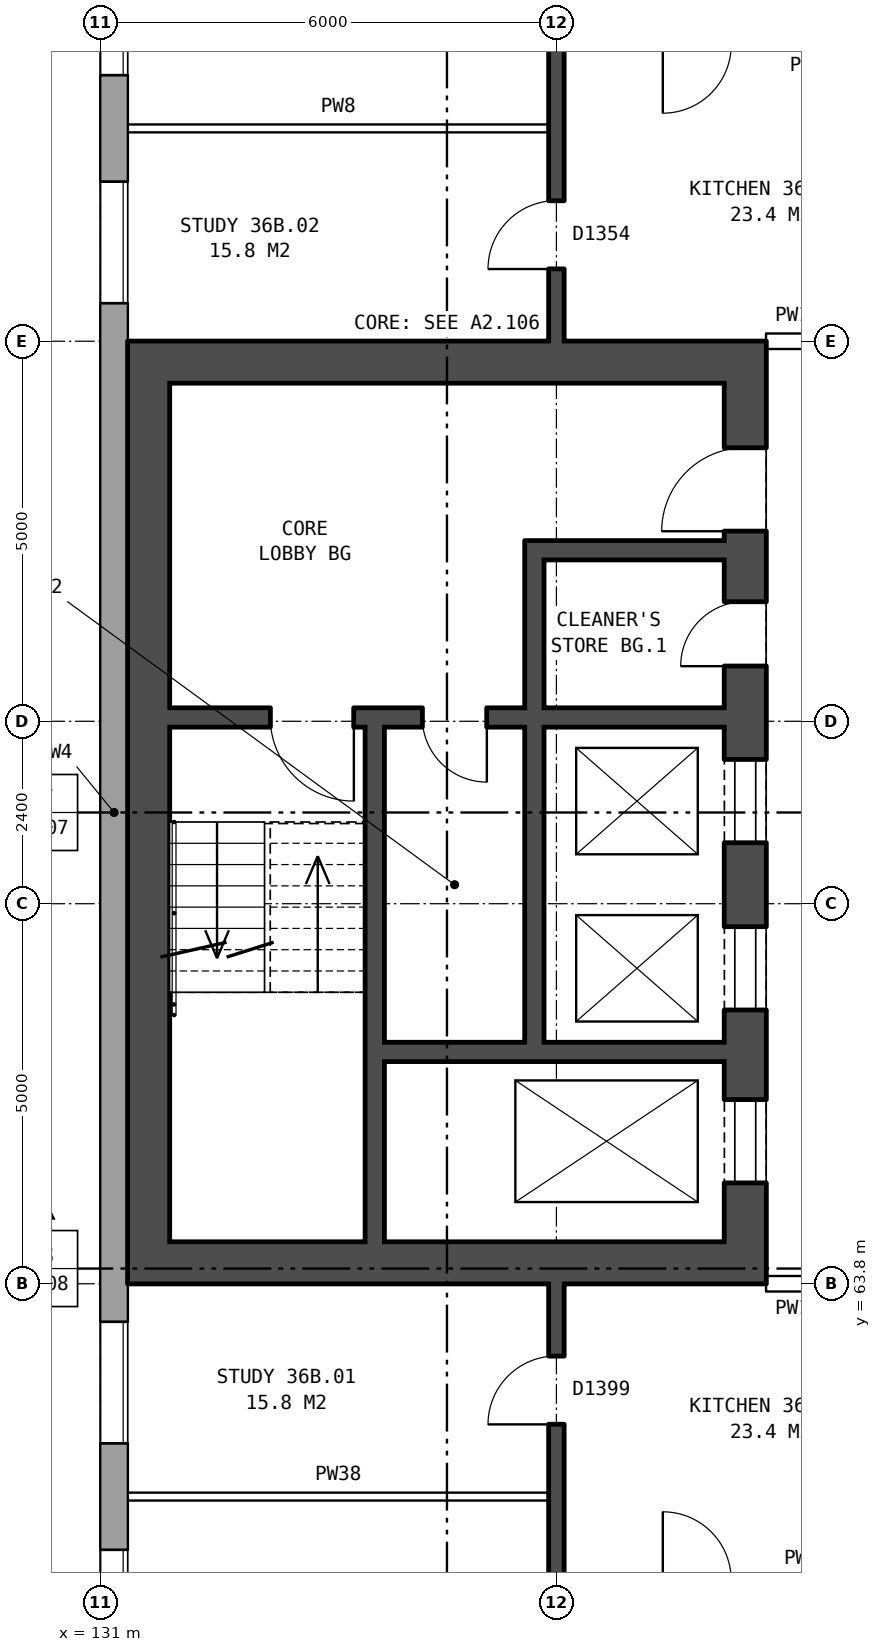
"""IFC4 building model, lengths in metres.
Left out: names, types, materials, properties, quantities, classifications, styles, units other than length and angle.
Written with IfcOpenShell. Run it as: python <this file> out.ifc"""

import sys

from ifc_helpers import new_model, si_unit, direction, frame, frame_2d, origin, place, context, subcontext, project, spatial, rectangle, extrude, element, fill, save


model = new_model("IFC4")
c1 = context("Model", 3, precision=1e-05, world=origin(), true_north=direction((0.0, 1.0)))
c2 = subcontext(c1, "Body", "Model", "MODEL_VIEW")
j1 = project(units=[si_unit("LENGTHUNIT", "METRE"), si_unit("PLANEANGLEUNIT", "RADIAN")], contexts=[c1])
p1 = place(None, origin())
s1 = spatial("IfcSite", under=j1, at=p1, CompositionType="ELEMENT")
p2 = place(p1, origin())
s2 = spatial("IfcBuilding", under=s1, at=p2, CompositionType="ELEMENT")
p3 = place(p2, frame((0.0, 0.0, 129.9)))
s3 = spatial("IfcBuildingStorey", under=s2, at=p3, CompositionType="ELEMENT", Elevation=129.9)
p4 = place(p3, frame((131.18, 82.925, 0.0), z_axis=(0.0, 0.0, 1.0), x_axis=(0.0, -1.0, 0.0)))
e1 = element("IfcWall", 1, at=p4, inside=s3, PredefinedType="STANDARD", context=c2, shape_type="SweptSolid", body=[
    extrude(rectangle(XDim=25.851, YDim=0.36, at=frame_2d((12.925, 0.0))), origin(), (0.0, 0.0, 1.0), 2.85),
])
p5 = place(p4, frame((1.625, 0.0, 0.8)))
e2 = element("IfcOpeningElement", 2, at=p5, cuts=e1, PredefinedType="OPENING", context=c2, shape_type="SweptSolid", body=[
    extrude(rectangle(XDim=1.6, YDim=1.8, at=frame_2d((0.8, 0.9))), frame((0.0, 0.19, 0.0), z_axis=(0.0, -1.0, 0.0), x_axis=(1.0, 0.0, 0.0)), (0.0, 0.0, 1.0), 0.38),
])
p6 = place(p4, frame((4.625, 0.0, 0.8)))
e3 = element("IfcOpeningElement", 3, at=p6, cuts=e1, PredefinedType="OPENING", context=c2, shape_type="SweptSolid", body=[
    extrude(rectangle(XDim=1.6, YDim=1.8, at=frame_2d((0.8, 0.9))), frame((0.0, 0.19, 0.0), z_axis=(0.0, -1.0, 0.0), x_axis=(1.0, 0.0, 0.0)), (0.0, 0.0, 1.0), 0.38),
])
p7 = place(p4, frame((19.625, 0.0, 0.8)))
e4 = element("IfcOpeningElement", 4, at=p7, cuts=e1, PredefinedType="OPENING", context=c2, shape_type="SweptSolid", body=[
    extrude(rectangle(XDim=1.6, YDim=1.8, at=frame_2d((0.8, 0.9))), frame((0.0, 0.19, 0.0), z_axis=(0.0, -1.0, 0.0), x_axis=(1.0, 0.0, 0.0)), (0.0, 0.0, 1.0), 0.38),
])
p8 = place(p4, frame((22.625, 0.0, 0.8)))
e5 = element("IfcOpeningElement", 5, at=p8, cuts=e1, PredefinedType="OPENING", context=c2, shape_type="SweptSolid", body=[
    extrude(rectangle(XDim=1.6, YDim=1.8, at=frame_2d((0.8, 0.9))), frame((0.0, 0.19, 0.0), z_axis=(0.0, -1.0, 0.0), x_axis=(1.0, 0.0, 0.0)), (0.0, 0.0, 1.0), 0.38),
])
p9 = place(p3, frame((139.485, 63.8, 0.0), z_axis=(0.0, 0.0, 1.0), x_axis=(0.0, 1.0, 0.0)))
e6 = element("IfcWall", 6, at=p9, inside=s3, PredefinedType="SHEAR", context=c2, shape_type="SweptSolid", body=[
    extrude(rectangle(XDim=12.4, YDim=0.55, at=frame_2d((6.2, 0.0))), origin(), (0.0, 0.0, 1.0), 2.85),
])
p10 = place(p9, frame((1.325, 0.0, 0.0)))
e7 = element("IfcOpeningElement", 7, at=p10, cuts=e6, PredefinedType="OPENING", context=c2, shape_type="SweptSolid", body=[
    extrude(rectangle(XDim=1.1, YDim=2.1, at=frame_2d((0.55, 1.05))), frame((0.0, 0.285, 0.0), z_axis=(0.0, -1.0, 0.0), x_axis=(1.0, 0.0, 0.0)), (0.0, 0.0, 1.0), 0.57),
])
p11 = place(p9, frame((3.6, 0.0, 0.0)))
e8 = element("IfcOpeningElement", 8, at=p11, cuts=e6, PredefinedType="OPENING", context=c2, shape_type="SweptSolid", body=[
    extrude(rectangle(XDim=1.1, YDim=2.1, at=frame_2d((0.55, 1.05))), frame((0.0, 0.285, 0.0), z_axis=(0.0, -1.0, 0.0), x_axis=(1.0, 0.0, 0.0)), (0.0, 0.0, 1.0), 0.57),
])
p12 = place(p9, frame((5.8, 0.0, 0.0)))
e9 = element("IfcOpeningElement", 9, at=p12, cuts=e6, PredefinedType="OPENING", context=c2, shape_type="SweptSolid", body=[
    extrude(rectangle(XDim=1.1, YDim=2.1, at=frame_2d((0.55, 1.05))), frame((0.0, 0.285, 0.0), z_axis=(0.0, -1.0, 0.0), x_axis=(1.0, 0.0, 0.0)), (0.0, 0.0, 1.0), 0.57),
])
p13 = place(p9, frame((9.9, 0.0, 0.0)))
e10 = element("IfcOpeningElement", 10, at=p13, cuts=e6, PredefinedType="OPENING", context=c2, shape_type="SweptSolid", body=[
    extrude(rectangle(XDim=1.1, YDim=2.1, at=frame_2d((0.55, 1.05))), frame((0.0, 0.285, 0.0), z_axis=(0.0, -1.0, 0.0), x_axis=(1.0, 0.0, 0.0)), (0.0, 0.0, 1.0), 0.57),
])
p14 = place(p9, frame((8.125, 0.0, 0.0)))
e11 = element("IfcOpeningElement", 11, at=p14, cuts=e6, PredefinedType="OPENING", context=c2, shape_type="SweptSolid", body=[
    extrude(rectangle(XDim=0.85, YDim=2.1, at=frame_2d((0.425, 1.05))), frame((0.0, 0.285, 0.0), z_axis=(0.0, -1.0, 0.0), x_axis=(1.0, 0.0, 0.0)), (0.0, 0.0, 1.0), 0.57),
])
p15 = place(p3, frame((131.635, 63.8, 0.0), z_axis=(0.0, 0.0, 1.0), x_axis=(0.0, 1.0, 0.0)))
e12 = element("IfcWall", 12, at=p15, inside=s3, PredefinedType="SHEAR", context=c2, shape_type="SweptSolid", body=[
    extrude(rectangle(XDim=12.4, YDim=0.55, at=frame_2d((6.2, 0.0))), origin(), (0.0, 0.0, 1.0), 2.85),
])
for number, where, z_axis, x_axis in (
    (13, (139.21, 64.075, 0.0), (0.0, 0.0, 1.0), (-1.0, 0.0, 0.0)),
    (14, (139.21, 75.925, 0.0), (0.0, 0.0, 1.0), (-1.0, 0.0, 0.0)),
):
    element("IfcWall", number, at=place(p3, frame(where, z_axis=z_axis, x_axis=x_axis)), inside=s3, PredefinedType="SHEAR", context=c2, shape_type="SweptSolid", body=[
        extrude(rectangle(XDim=7.3, YDim=0.55, at=frame_2d((3.65, 0.0))), origin(), (0.0, 0.0, 1.0), 2.85),
    ])
p16 = place(p3, frame((139.21, 66.85, 0.0), z_axis=(0.0, 0.0, 1.0), x_axis=(-1.0, 0.0, 0.0)))
e15 = element("IfcWall", 15, at=p16, inside=s3, PredefinedType="SHEAR", context=c2, shape_type="SweptSolid", body=[
    extrude(rectangle(XDim=4.475, YDim=0.25, at=frame_2d((2.237, 0.0))), origin(), (0.0, 0.0, 1.0), 2.85),
])
p17 = place(p3, frame((139.21, 71.25, 0.0), z_axis=(0.0, 0.0, 1.0), x_axis=(-1.0, 0.0, 0.0)))
e16 = element("IfcWall", 16, at=p17, inside=s3, PredefinedType="SHEAR", context=c2, shape_type="SweptSolid", body=[
    extrude(rectangle(XDim=7.3, YDim=0.25, at=frame_2d((3.65, 0.0))), origin(), (0.0, 0.0, 1.0), 2.85),
])
p18 = place(p17, frame((4.875, 0.0, 0.0)))
e17 = element("IfcOpeningElement", 17, at=p18, cuts=e16, PredefinedType="OPENING", context=c2, shape_type="SweptSolid", body=[
    extrude(rectangle(XDim=1.1, YDim=2.1, at=frame_2d((0.55, 1.05))), frame((0.0, 0.135, 0.0), z_axis=(0.0, -1.0, 0.0), x_axis=(1.0, 0.0, 0.0)), (0.0, 0.0, 1.0), 0.27),
])
p19 = place(p17, frame((3.125, 0.0, 0.0)))
e18 = element("IfcOpeningElement", 18, at=p19, cuts=e16, PredefinedType="OPENING", context=c2, shape_type="SweptSolid", body=[
    extrude(rectangle(XDim=0.85, YDim=2.1, at=frame_2d((0.425, 1.05))), frame((0.0, 0.135, 0.0), z_axis=(0.0, -1.0, 0.0), x_axis=(1.0, 0.0, 0.0)), (0.0, 0.0, 1.0), 0.27),
])
p20 = place(p3, frame((139.21, 73.45, 0.0), z_axis=(0.0, 0.0, 1.0), x_axis=(-1.0, 0.0, 0.0)))
e19 = element("IfcWall", 19, at=p20, inside=s3, PredefinedType="SHEAR", context=c2, shape_type="SweptSolid", body=[
    extrude(rectangle(XDim=2.375, YDim=0.25, at=frame_2d((1.188, 0.0))), origin(), (0.0, 0.0, 1.0), 2.85),
])
p21 = place(p3, frame((136.71, 66.975, 0.0), z_axis=(0.0, 0.0, 1.0), x_axis=(0.0, 1.0, 0.0)))
e20 = element("IfcWall", 20, at=p21, inside=s3, PredefinedType="SHEAR", context=c2, shape_type="SweptSolid", body=[
    extrude(rectangle(XDim=4.15, YDim=0.25, at=frame_2d((2.075, 0.0))), origin(), (0.0, 0.0, 1.0), 2.85),
])
p22 = place(p3, frame((136.71, 71.375, 0.0), z_axis=(0.0, 0.0, 1.0), x_axis=(0.0, 1.0, 0.0)))
e21 = element("IfcWall", 21, at=p22, inside=s3, PredefinedType="SHEAR", context=c2, shape_type="SweptSolid", body=[
    extrude(rectangle(XDim=2.2, YDim=0.25, at=frame_2d((1.1, 0.0))), origin(), (0.0, 0.0, 1.0), 2.85),
])
p23 = place(p3, frame((134.61, 64.35, 0.0), z_axis=(0.0, 0.0, 1.0), x_axis=(0.0, 1.0, 0.0)))
e22 = element("IfcWall", 22, at=p23, inside=s3, PredefinedType="SHEAR", context=c2, shape_type="SweptSolid", body=[
    extrude(rectangle(XDim=6.775, YDim=0.25, at=frame_2d((3.387, 0.0))), origin(), (0.0, 0.0, 1.0), 2.85),
])
p24 = place(p3, frame((131.36, 61.0, 0.0), z_axis=(0.0, 0.0, 1.0), x_axis=(1.0, 0.0, 0.0)))
e23 = element("IfcWall", 23, at=p24, inside=s3, PredefinedType="PARTITIONING", context=c2, shape_type="SweptSolid", body=[
    extrude(rectangle(XDim=5.54, YDim=0.1, at=frame_2d((2.77, 0.0))), origin(), (0.0, 0.0, 1.0), 2.85),
])
p25 = place(p3, frame((139.76, 63.8, 0.0), z_axis=(0.0, 0.0, 1.0), x_axis=(1.0, 0.0, 0.0)))
e24 = element("IfcWall", 24, at=p25, inside=s3, PredefinedType="PARTITIONING", context=c2, shape_type="SweptSolid", body=[
    extrude(rectangle(XDim=3.0, YDim=0.2, at=frame_2d((1.5, 0.0))), origin(), (0.0, 0.0, 1.0), 2.85),
])
p26 = place(p25, frame((1.0, 0.0, 0.0)))
e25 = element("IfcOpeningElement", 25, at=p26, cuts=e24, PredefinedType="OPENING", context=c2, shape_type="SweptSolid", body=[
    extrude(rectangle(XDim=1.0, YDim=2.1, at=frame_2d((0.5, 1.05))), frame((0.0, 0.11, 0.0), z_axis=(0.0, -1.0, 0.0), x_axis=(1.0, 0.0, 0.0)), (0.0, 0.0, 1.0), 0.22),
])
p27 = place(p3, frame((139.76, 76.2, 0.0), z_axis=(0.0, 0.0, 1.0), x_axis=(1.0, 0.0, 0.0)))
e26 = element("IfcWall", 26, at=p27, inside=s3, PredefinedType="PARTITIONING", context=c2, shape_type="SweptSolid", body=[
    extrude(rectangle(XDim=3.0, YDim=0.2, at=frame_2d((1.5, 0.0))), origin(), (0.0, 0.0, 1.0), 2.85),
])
p28 = place(p27, frame((1.0, 0.0, 0.0)))
e27 = element("IfcOpeningElement", 27, at=p28, cuts=e26, PredefinedType="OPENING", context=c2, shape_type="SweptSolid", body=[
    extrude(rectangle(XDim=1.0, YDim=2.1, at=frame_2d((0.5, 1.05))), frame((0.0, 0.11, 0.0), z_axis=(0.0, -1.0, 0.0), x_axis=(1.0, 0.0, 0.0)), (0.0, 0.0, 1.0), 0.22),
])
p29 = place(p3, frame((131.36, 79.0, 0.0), z_axis=(0.0, 0.0, 1.0), x_axis=(1.0, 0.0, 0.0)))
e28 = element("IfcWall", 28, at=p29, inside=s3, PredefinedType="PARTITIONING", context=c2, shape_type="SweptSolid", body=[
    extrude(rectangle(XDim=5.54, YDim=0.1, at=frame_2d((2.77, 0.0))), origin(), (0.0, 0.0, 1.0), 2.85),
])
p30 = place(p3, frame((137.0, 54.36, 0.0), z_axis=(0.0, 0.0, 1.0), x_axis=(0.0, 1.0, 0.0)))
e29 = element("IfcWall", 29, at=p30, inside=s3, PredefinedType="SOLIDWALL", context=c2, shape_type="SweptSolid", body=[
    extrude(rectangle(XDim=9.44, YDim=0.2, at=frame_2d((4.72, 0.0))), origin(), (0.0, 0.0, 1.0), 2.85),
])
p31 = place(p30, frame((2.32, 0.0, 0.0)))
e30 = element("IfcOpeningElement", 30, at=p31, cuts=e29, PredefinedType="OPENING", context=c2, shape_type="SweptSolid", body=[
    extrude(rectangle(XDim=0.9, YDim=2.1, at=frame_2d((0.45, 1.05))), frame((0.0, 0.11, 0.0), z_axis=(0.0, -1.0, 0.0), x_axis=(1.0, 0.0, 0.0)), (0.0, 0.0, 1.0), 0.22),
])
p32 = place(p30, frame((7.59, 0.0, 0.0)))
e31 = element("IfcOpeningElement", 31, at=p32, cuts=e29, PredefinedType="OPENING", context=c2, shape_type="SweptSolid", body=[
    extrude(rectangle(XDim=0.9, YDim=2.1, at=frame_2d((0.45, 1.05))), frame((0.0, 0.11, 0.0), z_axis=(0.0, -1.0, 0.0), x_axis=(1.0, 0.0, 0.0)), (0.0, 0.0, 1.0), 0.22),
])
p33 = place(p3, frame((137.0, 76.2, 0.0), z_axis=(0.0, 0.0, 1.0), x_axis=(0.0, 1.0, 0.0)))
e32 = element("IfcWall", 32, at=p33, inside=s3, PredefinedType="SOLIDWALL", context=c2, shape_type="SweptSolid", body=[
    extrude(rectangle(XDim=9.44, YDim=0.2, at=frame_2d((4.72, 0.0))), origin(), (0.0, 0.0, 1.0), 2.85),
])
p34 = place(p33, frame((6.22, 0.0, 0.0)))
e33 = element("IfcOpeningElement", 33, at=p34, cuts=e32, PredefinedType="OPENING", context=c2, shape_type="SweptSolid", body=[
    extrude(rectangle(XDim=0.9, YDim=2.1, at=frame_2d((0.45, 1.05))), frame((0.0, 0.11, 0.0), z_axis=(0.0, -1.0, 0.0), x_axis=(1.0, 0.0, 0.0)), (0.0, 0.0, 1.0), 0.22),
])
p35 = place(p33, frame((0.95, 0.0, 0.0)))
e34 = element("IfcOpeningElement", 34, at=p35, cuts=e32, PredefinedType="OPENING", context=c2, shape_type="SweptSolid", body=[
    extrude(rectangle(XDim=0.9, YDim=2.1, at=frame_2d((0.45, 1.05))), frame((0.0, 0.11, 0.0), z_axis=(0.0, -1.0, 0.0), x_axis=(1.0, 0.0, 0.0)), (0.0, 0.0, 1.0), 0.22),
])
p36 = place(p5, origin())
e35 = element("IfcWindow", 35, at=p36, inside=s3, PartitioningType="SINGLE_PANEL", PredefinedType="WINDOW", context=c2, shape_type="SweptSolid", body=[
    extrude(rectangle(XDim=1.6, YDim=1.8, at=frame_2d((0.8, 0.9))), frame((0.0, 0.15, 0.0), z_axis=(0.0, -1.0, 0.0), x_axis=(1.0, 0.0, 0.0)), (0.0, 0.0, 1.0), 0.06),
])
fill(e2, e35)
p37 = place(p6, origin())
e36 = element("IfcWindow", 36, at=p37, inside=s3, PartitioningType="SINGLE_PANEL", PredefinedType="WINDOW", context=c2, shape_type="SweptSolid", body=[
    extrude(rectangle(XDim=1.6, YDim=1.8, at=frame_2d((0.8, 0.9))), frame((0.0, 0.15, 0.0), z_axis=(0.0, -1.0, 0.0), x_axis=(1.0, 0.0, 0.0)), (0.0, 0.0, 1.0), 0.06),
])
fill(e3, e36)
p38 = place(p7, origin())
e37 = element("IfcWindow", 37, at=p38, inside=s3, PartitioningType="SINGLE_PANEL", PredefinedType="WINDOW", context=c2, shape_type="SweptSolid", body=[
    extrude(rectangle(XDim=1.6, YDim=1.8, at=frame_2d((0.8, 0.9))), frame((0.0, 0.15, 0.0), z_axis=(0.0, -1.0, 0.0), x_axis=(1.0, 0.0, 0.0)), (0.0, 0.0, 1.0), 0.06),
])
fill(e4, e37)
p39 = place(p8, origin())
e38 = element("IfcWindow", 38, at=p39, inside=s3, PartitioningType="SINGLE_PANEL", PredefinedType="WINDOW", context=c2, shape_type="SweptSolid", body=[
    extrude(rectangle(XDim=1.6, YDim=1.8, at=frame_2d((0.8, 0.9))), frame((0.0, 0.15, 0.0), z_axis=(0.0, -1.0, 0.0), x_axis=(1.0, 0.0, 0.0)), (0.0, 0.0, 1.0), 0.06),
])
fill(e5, e38)
p40 = place(p10, origin())
e39 = element("IfcDoor", 39, at=p40, inside=s3, OperationType="DOUBLE_DOOR_SLIDING", PredefinedType="DOOR", context=c2, shape_type="SweptSolid", body=[
    extrude(rectangle(XDim=1.1, YDim=2.1, at=frame_2d((0.55, 1.05))), frame((0.0, 0.26, 0.0), z_axis=(0.0, -1.0, 0.0), x_axis=(1.0, 0.0, 0.0)), (0.0, 0.0, 1.0), 0.05),
])
fill(e7, e39)
p41 = place(p11, origin())
e40 = element("IfcDoor", 40, at=p41, inside=s3, OperationType="DOUBLE_DOOR_SLIDING", PredefinedType="DOOR", context=c2, shape_type="SweptSolid", body=[
    extrude(rectangle(XDim=1.1, YDim=2.1, at=frame_2d((0.55, 1.05))), frame((0.0, 0.26, 0.0), z_axis=(0.0, -1.0, 0.0), x_axis=(1.0, 0.0, 0.0)), (0.0, 0.0, 1.0), 0.05),
])
fill(e8, e40)
p42 = place(p12, origin())
e41 = element("IfcDoor", 41, at=p42, inside=s3, OperationType="DOUBLE_DOOR_SLIDING", PredefinedType="DOOR", context=c2, shape_type="SweptSolid", body=[
    extrude(rectangle(XDim=1.1, YDim=2.1, at=frame_2d((0.55, 1.05))), frame((0.0, 0.26, 0.0), z_axis=(0.0, -1.0, 0.0), x_axis=(1.0, 0.0, 0.0)), (0.0, 0.0, 1.0), 0.05),
])
fill(e9, e41)
p43 = place(p13, origin())
e42 = element("IfcDoor", 42, at=p43, inside=s3, OperationType="SINGLE_SWING_LEFT", PredefinedType="DOOR", context=c2, shape_type="SweptSolid", body=[
    extrude(rectangle(XDim=1.1, YDim=2.1, at=frame_2d((0.55, 1.05))), frame((0.0, 0.26, 0.0), z_axis=(0.0, -1.0, 0.0), x_axis=(1.0, 0.0, 0.0)), (0.0, 0.0, 1.0), 0.05),
])
fill(e10, e42)
p44 = place(p18, origin())
e43 = element("IfcDoor", 43, at=p44, inside=s3, OperationType="SINGLE_SWING_LEFT", PredefinedType="DOOR", context=c2, shape_type="SweptSolid", body=[
    extrude(rectangle(XDim=1.1, YDim=2.1, at=frame_2d((0.55, 1.05))), frame((0.0, 0.025, 0.0), z_axis=(0.0, -1.0, 0.0), x_axis=(1.0, 0.0, 0.0)), (0.0, 0.0, 1.0), 0.05),
])
fill(e17, e43)
p45 = place(p14, origin())
e44 = element("IfcDoor", 44, at=p45, inside=s3, OperationType="SINGLE_SWING_LEFT", PredefinedType="DOOR", context=c2, shape_type="SweptSolid", body=[
    extrude(rectangle(XDim=0.85, YDim=2.1, at=frame_2d((0.425, 1.05))), frame((0.0, 0.26, 0.0), z_axis=(0.0, -1.0, 0.0), x_axis=(1.0, 0.0, 0.0)), (0.0, 0.0, 1.0), 0.05),
])
fill(e11, e44)
p46 = place(p19, origin())
e45 = element("IfcDoor", 45, at=p46, inside=s3, OperationType="SINGLE_SWING_LEFT", PredefinedType="DOOR", context=c2, shape_type="SweptSolid", body=[
    extrude(rectangle(XDim=0.85, YDim=2.1, at=frame_2d((0.425, 1.05))), frame((0.0, 0.025, 0.0), z_axis=(0.0, -1.0, 0.0), x_axis=(1.0, 0.0, 0.0)), (0.0, 0.0, 1.0), 0.05),
])
fill(e18, e45)
p47 = place(p32, origin())
e46 = element("IfcDoor", 46, at=p47, inside=s3, OperationType="SINGLE_SWING_LEFT", PredefinedType="DOOR", context=c2, shape_type="SweptSolid", body=[
    extrude(rectangle(XDim=0.9, YDim=2.1, at=frame_2d((0.45, 1.05))), frame((0.0, 0.025, 0.0), z_axis=(0.0, -1.0, 0.0), x_axis=(1.0, 0.0, 0.0)), (0.0, 0.0, 1.0), 0.05),
])
fill(e31, e46)
p48 = place(p35, origin())
e47 = element("IfcDoor", 47, at=p48, inside=s3, OperationType="SINGLE_SWING_LEFT", PredefinedType="DOOR", context=c2, shape_type="SweptSolid", body=[
    extrude(rectangle(XDim=0.9, YDim=2.1, at=frame_2d((0.45, 1.05))), frame((0.0, 0.025, 0.0), z_axis=(0.0, -1.0, 0.0), x_axis=(1.0, 0.0, 0.0)), (0.0, 0.0, 1.0), 0.05),
])
fill(e34, e47)
save(model, sys.argv[1])
